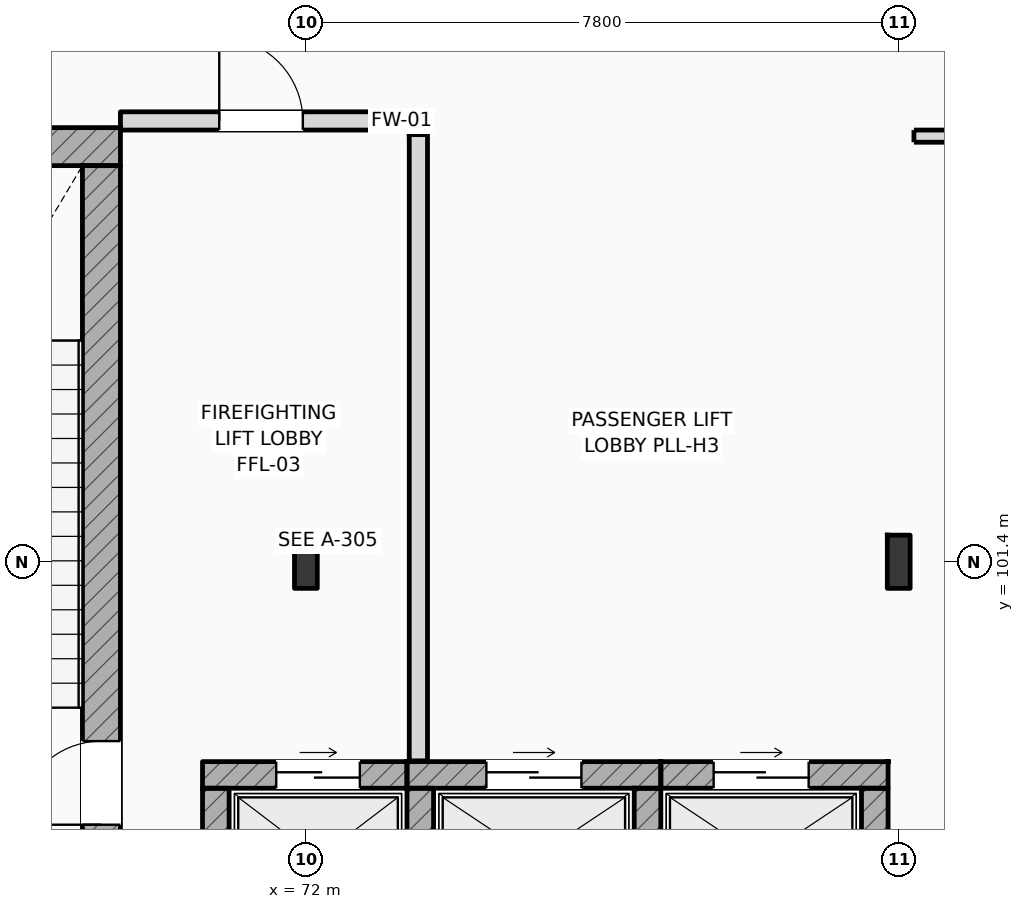
"""IFC4 building model, lengths in metres.
Left out: names, types, materials, properties, quantities, classifications, styles, units other than length and angle.
Written with IfcOpenShell. Run it as: python <this file> out.ifc"""

import sys

from ifc_helpers import new_model, si_unit, direction, frame, frame_2d, origin, origin_2d, place, context, subcontext, project, spatial, rectangle, i_section, extrude, element, fill, save


model = new_model("IFC4")
c1 = context("Model", 3, precision=1e-05, world=origin(), true_north=direction((0.0, 1.0)))
c2 = subcontext(c1, "Body", "Model", "MODEL_VIEW")
j1 = project(units=[si_unit("LENGTHUNIT", "METRE"), si_unit("PLANEANGLEUNIT", "RADIAN")], contexts=[c1])
p1 = place(None, origin())
s1 = spatial("IfcSite", under=j1, at=p1, CompositionType="ELEMENT")
p2 = place(p1, origin())
s2 = spatial("IfcBuilding", under=s1, at=p2, CompositionType="ELEMENT")
p3 = place(p2, frame((0.0, 0.0, 6.0)))
s3 = spatial("IfcBuildingStorey", under=s2, at=p3, CompositionType="ELEMENT", Elevation=6.0)
for number, where, z_axis, x_axis in (
    (1, (72.0, 101.4, 0.0), (0.0, 0.0, 1.0), (1.0, 0.0, 0.0)),
    (2, (79.8, 101.4, 0.0), (0.0, 0.0, 1.0), (1.0, 0.0, 0.0)),
):
    element("IfcColumn", number, at=place(p3, frame(where, z_axis=z_axis, x_axis=x_axis)), inside=s3, PredefinedType="COLUMN", context=c2, shape_type="SweptSolid", body=[
        extrude(i_section(OverallWidth=0.3, OverallDepth=0.7, WebThickness=0.017, FlangeThickness=0.032, FilletRadius=0.027, at=origin_2d()), origin(), (0.0, 0.0, 1.0), 5.4),
    ])
p4 = place(p3, frame((64.4, 106.862, 0.0), z_axis=(0.0, 0.0, 1.0), x_axis=(1.0, 0.0, 0.0)))
e3 = element("IfcWall", 3, at=p4, inside=s3, PredefinedType="SHEAR", context=c2, shape_type="SweptSolid", body=[
    extrude(rectangle(XDim=5.16, YDim=0.5, at=frame_2d((2.58, 0.0))), origin(), (0.0, 0.0, 1.0), 5.4),
])
p5 = place(p3, frame((69.31, 97.5, 0.0), z_axis=(0.0, 0.0, 1.0), x_axis=(0.0, 1.0, 0.0)))
e4 = element("IfcWall", 4, at=p5, inside=s3, PredefinedType="SHEAR", context=c2, shape_type="SweptSolid", body=[
    extrude(rectangle(XDim=9.112, YDim=0.5, at=frame_2d((4.556, 0.0))), origin(), (0.0, 0.0, 1.0), 5.4),
])
p6 = place(p5, frame((0.44, 0.0, 0.0)))
e5 = element("IfcOpeningElement", 5, at=p6, cuts=e4, PredefinedType="OPENING", context=c2, shape_type="SweptSolid", body=[
    extrude(rectangle(XDim=1.1, YDim=2.2, at=frame_2d((0.55, 1.1))), frame((0.0, 0.26, 0.0), z_axis=(0.0, -1.0, 0.0), x_axis=(1.0, 0.0, 0.0)), (0.0, 0.0, 1.0), 0.52),
])
p7 = place(p3, frame((70.64, 98.595, 0.0), z_axis=(0.0, 0.0, 1.0), x_axis=(1.0, 0.0, 0.0)))
e6 = element("IfcWall", 6, at=p7, inside=s3, PredefinedType="SHEAR", context=c2, shape_type="SweptSolid", body=[
    extrude(rectangle(XDim=2.69, YDim=0.35, at=frame_2d((1.345, 0.0))), origin(), (0.0, 0.0, 1.0), 5.05),
])
p8 = place(p7, frame((0.97, 0.0, 0.0)))
e7 = element("IfcOpeningElement", 7, at=p8, cuts=e6, PredefinedType="OPENING", context=c2, shape_type="SweptSolid", body=[
    extrude(rectangle(XDim=1.1, YDim=2.2, at=frame_2d((0.55, 1.1))), frame((0.0, 0.185, 0.0), z_axis=(0.0, -1.0, 0.0), x_axis=(1.0, 0.0, 0.0)), (0.0, 0.0, 1.0), 0.37),
])
p9 = place(p3, frame((70.815, 96.58, 0.0), z_axis=(0.0, 0.0, 1.0), x_axis=(0.0, 1.0, 0.0)))
e8 = element("IfcWall", 8, at=p9, inside=s3, PredefinedType="SHEAR", context=c2, shape_type="SweptSolid", body=[
    extrude(rectangle(XDim=1.84, YDim=0.35, at=frame_2d((0.92, 0.0))), origin(), (0.0, 0.0, 1.0), 5.05),
])
p10 = place(p3, frame((73.33, 98.595, 0.0), z_axis=(0.0, 0.0, 1.0), x_axis=(1.0, 0.0, 0.0)))
e9 = element("IfcWall", 9, at=p10, inside=s3, PredefinedType="SHEAR", context=c2, shape_type="SweptSolid", body=[
    extrude(rectangle(XDim=3.34, YDim=0.35, at=frame_2d((1.67, 0.0))), origin(), (0.0, 0.0, 1.0), 5.05),
])
p11 = place(p10, frame((1.045, 0.0, 0.0)))
e10 = element("IfcOpeningElement", 10, at=p11, cuts=e9, PredefinedType="OPENING", context=c2, shape_type="SweptSolid", body=[
    extrude(rectangle(XDim=1.25, YDim=2.25, at=frame_2d((0.625, 1.125))), frame((0.0, 0.185, 0.0), z_axis=(0.0, -1.0, 0.0), x_axis=(1.0, 0.0, 0.0)), (0.0, 0.0, 1.0), 0.37),
])
for number, where, z_axis, x_axis in (
    (11, (73.505, 96.58, 0.0), (0.0, 0.0, 1.0), (0.0, 1.0, 0.0)),
    (12, (76.495, 96.58, 0.0), (0.0, 0.0, 1.0), (0.0, 1.0, 0.0)),
):
    element("IfcWall", number, at=place(p3, frame(where, z_axis=z_axis, x_axis=x_axis)), inside=s3, PredefinedType="SHEAR", context=c2, shape_type="SweptSolid", body=[
        extrude(rectangle(XDim=1.84, YDim=0.35, at=frame_2d((0.92, 0.0))), origin(), (0.0, 0.0, 1.0), 5.05),
    ])
p12 = place(p3, frame((76.67, 98.595, 0.0), z_axis=(0.0, 0.0, 1.0), x_axis=(1.0, 0.0, 0.0)))
e13 = element("IfcWall", 13, at=p12, inside=s3, PredefinedType="SHEAR", context=c2, shape_type="SweptSolid", body=[
    extrude(rectangle(XDim=2.99, YDim=0.35, at=frame_2d((1.495, 0.0))), origin(), (0.0, 0.0, 1.0), 5.05),
])
p13 = place(p12, frame((0.695, 0.0, 0.0)))
e14 = element("IfcOpeningElement", 14, at=p13, cuts=e13, PredefinedType="OPENING", context=c2, shape_type="SweptSolid", body=[
    extrude(rectangle(XDim=1.25, YDim=2.25, at=frame_2d((0.625, 1.125))), frame((0.0, 0.185, 0.0), z_axis=(0.0, -1.0, 0.0), x_axis=(1.0, 0.0, 0.0)), (0.0, 0.0, 1.0), 0.37),
])
p14 = place(p3, frame((79.485, 96.58, 0.0), z_axis=(0.0, 0.0, 1.0), x_axis=(0.0, 1.0, 0.0)))
e15 = element("IfcWall", 15, at=p14, inside=s3, PredefinedType="SHEAR", context=c2, shape_type="SweptSolid", body=[
    extrude(rectangle(XDim=1.84, YDim=0.35, at=frame_2d((0.92, 0.0))), origin(), (0.0, 0.0, 1.0), 4.59),
])
p15 = place(p3, frame((73.48, 98.78, 0.0), z_axis=(0.0, 0.0, 1.0), x_axis=(0.0, 1.0, 0.0)))
e16 = element("IfcWall", 16, at=p15, inside=s3, PredefinedType="STANDARD", context=c2, shape_type="SweptSolid", body=[
    extrude(rectangle(XDim=8.24, YDim=0.24, at=frame_2d((4.12, 0.0))), origin(), (0.0, 0.0, 1.0), 5.05),
])
p16 = place(p3, frame((69.56, 107.2, 0.0), z_axis=(0.0, 0.0, 1.0), x_axis=(1.0, 0.0, 0.0)))
e17 = element("IfcWall", 17, at=p16, inside=s3, PredefinedType="STANDARD", context=c2, shape_type="SweptSolid", body=[
    extrude(rectangle(XDim=4.1, YDim=0.24, at=frame_2d((2.05, 0.0))), origin(), (0.0, 0.0, 1.0), 5.05),
])
p17 = place(p16, frame((1.3, 0.0, 0.0)))
e18 = element("IfcOpeningElement", 18, at=p17, cuts=e17, PredefinedType="OPENING", context=c2, shape_type="SweptSolid", body=[
    extrude(rectangle(XDim=1.1, YDim=2.2, at=frame_2d((0.55, 1.1))), frame((0.0, 0.13, 0.0), z_axis=(0.0, -1.0, 0.0), x_axis=(1.0, 0.0, 0.0)), (0.0, 0.0, 1.0), 0.26),
])
p18 = place(p3, frame((80.0, 107.0, 0.0), z_axis=(0.0, 0.0, 1.0), x_axis=(1.0, 0.0, 0.0)))
e19 = element("IfcWall", 19, at=p18, inside=s3, PredefinedType="PARTITIONING", context=c2, shape_type="SweptSolid", body=[
    extrude(rectangle(XDim=39.35, YDim=0.16, at=frame_2d((19.675, 0.0))), origin(), (0.0, 0.0, 1.0), 5.05),
])
p19 = place(p18, frame((19.025, 0.0, 0.0)))
e20 = element("IfcOpeningElement", 20, at=p19, cuts=e19, PredefinedType="OPENING", context=c2, shape_type="SweptSolid", body=[
    extrude(rectangle(XDim=1.3, YDim=2.2, at=frame_2d((0.65, 1.1))), frame((0.0, 0.09, 0.0), z_axis=(0.0, -1.0, 0.0), x_axis=(1.0, 0.0, 0.0)), (0.0, 0.0, 1.0), 0.18),
])
p20 = place(p6, origin())
e21 = element("IfcDoor", 21, at=p20, inside=s3, OperationType="SINGLE_SWING_LEFT", PredefinedType="DOOR", context=c2, shape_type="SweptSolid", body=[
    extrude(rectangle(XDim=1.1, YDim=2.2, at=frame_2d((0.55, 1.1))), frame((0.0, 0.025, 0.0), z_axis=(0.0, -1.0, 0.0), x_axis=(1.0, 0.0, 0.0)), (0.0, 0.0, 1.0), 0.05),
])
fill(e5, e21)
p21 = place(p8, origin())
e22 = element("IfcDoor", 22, at=p21, inside=s3, OperationType="SLIDING_TO_LEFT", PredefinedType="DOOR", context=c2, shape_type="SweptSolid", body=[
    extrude(rectangle(XDim=1.1, YDim=2.2, at=frame_2d((0.55, 1.1))), frame((0.0, 0.025, 0.0), z_axis=(0.0, -1.0, 0.0), x_axis=(1.0, 0.0, 0.0)), (0.0, 0.0, 1.0), 0.05),
])
fill(e7, e22)
p22 = place(p11, origin())
e23 = element("IfcDoor", 23, at=p22, inside=s3, OperationType="SLIDING_TO_LEFT", PredefinedType="DOOR", context=c2, shape_type="SweptSolid", body=[
    extrude(rectangle(XDim=1.25, YDim=2.25, at=frame_2d((0.625, 1.125))), frame((0.0, 0.025, 0.0), z_axis=(0.0, -1.0, 0.0), x_axis=(1.0, 0.0, 0.0)), (0.0, 0.0, 1.0), 0.05),
])
fill(e10, e23)
p23 = place(p13, origin())
e24 = element("IfcDoor", 24, at=p23, inside=s3, OperationType="SLIDING_TO_LEFT", PredefinedType="DOOR", context=c2, shape_type="SweptSolid", body=[
    extrude(rectangle(XDim=1.25, YDim=2.25, at=frame_2d((0.625, 1.125))), frame((0.0, 0.025, 0.0), z_axis=(0.0, -1.0, 0.0), x_axis=(1.0, 0.0, 0.0)), (0.0, 0.0, 1.0), 0.05),
])
fill(e14, e24)
p24 = place(p17, origin())
e25 = element("IfcDoor", 25, at=p24, inside=s3, OperationType="SINGLE_SWING_LEFT", PredefinedType="DOOR", context=c2, shape_type="SweptSolid", body=[
    extrude(rectangle(XDim=1.1, YDim=2.2, at=frame_2d((0.55, 1.1))), frame((0.0, 0.025, 0.0), z_axis=(0.0, -1.0, 0.0), x_axis=(1.0, 0.0, 0.0)), (0.0, 0.0, 1.0), 0.05),
])
fill(e18, e25)
save(model, sys.argv[1])
